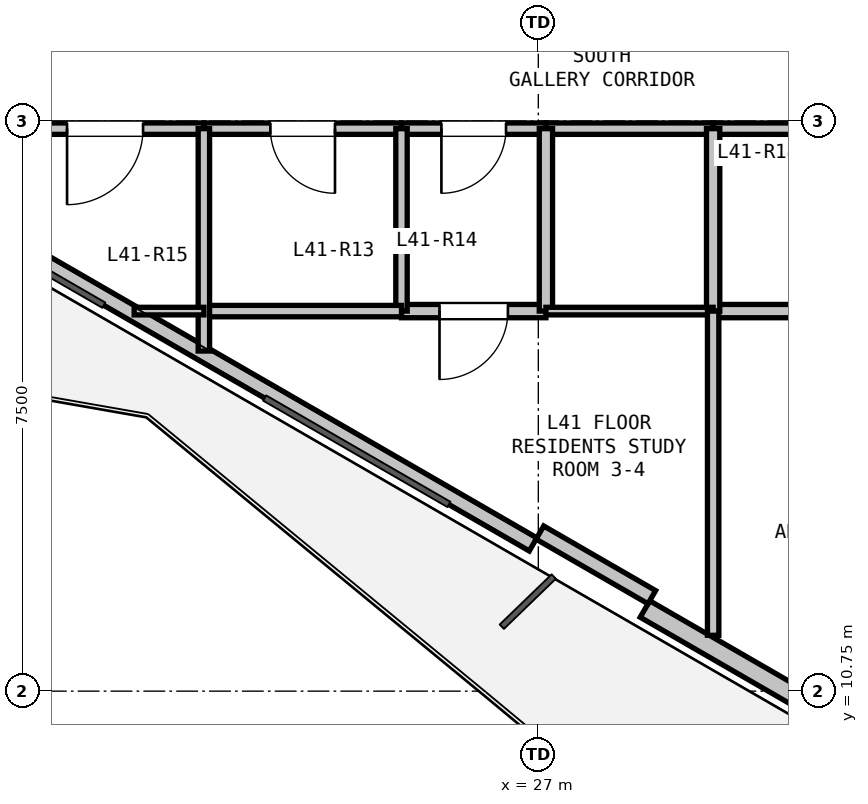
"""IFC4 building model, lengths in metres.
Left out: names, types, materials, properties, quantities, classifications, styles, units other than length and angle.
Written with IfcOpenShell. Run it as: python <this file> out.ifc"""

import sys

from ifc_helpers import new_model, si_unit, direction, frame, frame_2d, origin, place, context, subcontext, project, spatial, rectangle, extrude, element, fill, save


model = new_model("IFC4")
c1 = context("Model", 3, precision=1e-05, world=origin(), true_north=direction((0.0, 1.0)))
c2 = subcontext(c1, "Body", "Model", "MODEL_VIEW")
j1 = project(units=[si_unit("LENGTHUNIT", "METRE"), si_unit("PLANEANGLEUNIT", "RADIAN")], contexts=[c1])
p1 = place(None, origin())
s1 = spatial("IfcSite", under=j1, at=p1, CompositionType="ELEMENT")
p2 = place(p1, origin())
s2 = spatial("IfcBuilding", under=s1, at=p2, CompositionType="ELEMENT")
p3 = place(p2, frame((0.0, 0.0, 147.6)))
s3 = spatial("IfcBuildingStorey", under=s2, at=p3, CompositionType="ELEMENT", Elevation=147.6)
p4 = place(p3, frame((38.091, 6.237, 0.0), z_axis=(0.0, 0.0, 1.0), x_axis=(-0.86602239209, 0.500005216371, 0.0)))
e1 = element("IfcWall", 1, at=p4, inside=s3, PredefinedType="SOLIDWALL", context=c2, shape_type="SweptSolid", body=[
    extrude(rectangle(XDim=11.186, YDim=0.25, at=frame_2d((5.593, 0.0))), origin(), (0.0, 0.0, 1.0), 2.68),
])
p5 = place(p4, frame((7.095, 0.0, 0.0)))
e2 = element("IfcOpeningElement", 2, at=p5, cuts=e1, PredefinedType="OPENING", context=c2, shape_type="SweptSolid", body=[
    extrude(rectangle(XDim=1.1, YDim=2.1, at=frame_2d((0.55, 1.05))), frame((0.0, 0.135, 0.0), z_axis=(0.0, -1.0, 0.0), x_axis=(1.0, 0.0, 0.0)), (0.0, 0.0, 1.0), 0.27),
])
p6 = place(p4, frame((1.718, 0.0, 0.9)))
e3 = element("IfcOpeningElement", 3, at=p6, cuts=e1, PredefinedType="OPENING", context=c2, shape_type="SweptSolid", body=[
    extrude(rectangle(XDim=1.2, YDim=1.4, at=frame_2d((0.6, 0.7))), frame((0.0, 0.135, 0.0), z_axis=(0.0, -1.0, 0.0), x_axis=(1.0, 0.0, 0.0)), (0.0, 0.0, 1.0), 0.27),
])
p7 = place(p3, frame((26.931, 12.68, 0.0), z_axis=(0.0, 0.0, 1.0), x_axis=(-0.866026619769, 0.499997893847, 0.0)))
e4 = element("IfcWall", 4, at=p7, inside=s3, PredefinedType="PARAPET", context=c2, shape_type="SweptSolid", body=[
    extrude(rectangle(XDim=10.486, YDim=0.2, at=frame_2d((5.243, 0.0))), origin(), (0.0, 0.0, 1.0), 0.2),
])
p8 = place(p3, frame((28.493, 11.986, 0.0), z_axis=(0.0, 0.0, 1.0), x_axis=(-0.86605165483, 0.499954529098, 0.0)))
e5 = element("IfcWall", 5, at=p8, inside=s3, PredefinedType="PARAPET", context=c2, shape_type="SweptSolid", body=[
    extrude(rectangle(XDim=1.7, YDim=0.2, at=frame_2d((0.85, 0.0))), origin(), (0.0, 0.0, 1.0), 2.68),
])
p9 = place(p3, frame((31.3, 18.15, 0.0), z_axis=(0.0, 0.0, 1.0), x_axis=(-1.0, 0.0, 0.0)))
e6 = element("IfcWall", 6, at=p9, inside=s3, PredefinedType="PARTITIONING", context=c2, shape_type="SweptSolid", body=[
    extrude(rectangle(XDim=2.0, YDim=0.15, at=frame_2d((1.0, 0.0))), origin(), (0.0, 0.0, 1.0), 3.06),
])
p10 = place(p3, frame((29.3, 18.15, 0.0), z_axis=(0.0, 0.0, 1.0), x_axis=(-1.0, 0.0, 0.0)))
e7 = element("IfcWall", 7, at=p10, inside=s3, PredefinedType="PARTITIONING", context=c2, shape_type="SweptSolid", body=[
    extrude(rectangle(XDim=2.2, YDim=0.15, at=frame_2d((1.1, 0.0))), origin(), (0.0, 0.0, 1.0), 3.06),
])
p11 = place(p3, frame((27.1, 18.15, 0.0), z_axis=(0.0, 0.0, 1.0), x_axis=(-1.0, 0.0, 0.0)))
e8 = element("IfcWall", 8, at=p11, inside=s3, PredefinedType="PARTITIONING", context=c2, shape_type="SweptSolid", body=[
    extrude(rectangle(XDim=1.9, YDim=0.15, at=frame_2d((0.95, 0.0))), origin(), (0.0, 0.0, 1.0), 3.06),
])
p12 = place(p11, frame((0.525, 0.0, 0.0)))
e9 = element("IfcOpeningElement", 9, at=p12, cuts=e8, PredefinedType="OPENING", context=c2, shape_type="SweptSolid", body=[
    extrude(rectangle(XDim=0.85, YDim=2.1, at=frame_2d((0.425, 1.05))), frame((0.0, 0.085, 0.0), z_axis=(0.0, -1.0, 0.0), x_axis=(1.0, 0.0, 0.0)), (0.0, 0.0, 1.0), 0.17),
])
p13 = place(p3, frame((25.2, 18.15, 0.0), z_axis=(0.0, 0.0, 1.0), x_axis=(-1.0, 0.0, 0.0)))
e10 = element("IfcWall", 10, at=p13, inside=s3, PredefinedType="PARTITIONING", context=c2, shape_type="SweptSolid", body=[
    extrude(rectangle(XDim=2.6, YDim=0.15, at=frame_2d((1.3, 0.0))), origin(), (0.0, 0.0, 1.0), 2.433),
])
p14 = place(p13, frame((0.875, 0.0, 0.0)))
e11 = element("IfcOpeningElement", 11, at=p14, cuts=e10, PredefinedType="OPENING", context=c2, shape_type="SweptSolid", body=[
    extrude(rectangle(XDim=0.85, YDim=2.1, at=frame_2d((0.425, 1.05))), frame((0.0, 0.085, 0.0), z_axis=(0.0, -1.0, 0.0), x_axis=(1.0, 0.0, 0.0)), (0.0, 0.0, 1.0), 0.17),
])
p15 = place(p3, frame((22.6, 18.15, 0.0), z_axis=(0.0, 0.0, 1.0), x_axis=(-1.0, 0.0, 0.0)))
e12 = element("IfcWall", 12, at=p15, inside=s3, PredefinedType="PARTITIONING", context=c2, shape_type="SweptSolid", body=[
    extrude(rectangle(XDim=2.6, YDim=0.15, at=frame_2d((1.3, 0.0))), origin(), (0.0, 0.0, 1.0), 3.06),
])
p16 = place(p15, frame((0.8, 0.0, 0.0)))
e13 = element("IfcOpeningElement", 13, at=p16, cuts=e12, PredefinedType="OPENING", context=c2, shape_type="SweptSolid", body=[
    extrude(rectangle(XDim=1.0, YDim=2.15, at=frame_2d((0.5, 1.075))), frame((0.0, 0.085, 0.0), z_axis=(0.0, -1.0, 0.0), x_axis=(1.0, 0.0, 0.0)), (0.0, 0.0, 1.0), 0.17),
])
p17 = place(p3, frame((27.1, 15.75, 0.0), z_axis=(0.0, 0.0, 1.0), x_axis=(-1.0, 0.0, 0.0)))
e14 = element("IfcWall", 14, at=p17, inside=s3, PredefinedType="PLUMBINGWALL", context=c2, shape_type="SweptSolid", body=[
    extrude(rectangle(XDim=1.9, YDim=0.175, at=frame_2d((0.95, 0.0))), origin(), (0.0, 0.0, 1.0), 2.433),
])
p18 = place(p17, frame((0.5, 0.0, 0.0)))
e15 = element("IfcOpeningElement", 15, at=p18, cuts=e14, PredefinedType="OPENING", context=c2, shape_type="SweptSolid", body=[
    extrude(rectangle(XDim=0.9, YDim=2.1, at=frame_2d((0.45, 1.05))), frame((0.0, 0.097, 0.0), z_axis=(0.0, -1.0, 0.0), x_axis=(1.0, 0.0, 0.0)), (0.0, 0.0, 1.0), 0.195),
])
p19 = place(p3, frame((25.2, 15.75, 0.0), z_axis=(0.0, 0.0, 1.0), x_axis=(0.0, 1.0, 0.0)))
e16 = element("IfcWall", 16, at=p19, inside=s3, PredefinedType="PARTITIONING", context=c2, shape_type="SweptSolid", body=[
    extrude(rectangle(XDim=2.4, YDim=0.15, at=frame_2d((1.2, 0.0))), origin(), (0.0, 0.0, 1.0), 2.433),
])
p20 = place(p3, frame((27.1, 18.15, 0.0), z_axis=(0.0, 0.0, 1.0), x_axis=(0.0, -1.0, 0.0)))
e17 = element("IfcWall", 17, at=p20, inside=s3, PredefinedType="PLUMBINGWALL", context=c2, shape_type="SweptSolid", body=[
    extrude(rectangle(XDim=2.4, YDim=0.175, at=frame_2d((1.2, 0.0))), origin(), (0.0, 0.0, 1.0), 2.433),
])
p21 = place(p3, frame((31.3, 15.75, 0.0), z_axis=(0.0, 0.0, 1.0), x_axis=(-1.0, 0.0, 0.0)))
e18 = element("IfcWall", 18, at=p21, inside=s3, PredefinedType="PLUMBINGWALL", context=c2, shape_type="SweptSolid", body=[
    extrude(rectangle(XDim=2.0, YDim=0.175, at=frame_2d((1.0, 0.0))), origin(), (0.0, 0.0, 1.0), 3.06),
])
p22 = place(p3, frame((29.3, 15.75, 0.0), z_axis=(0.0, 0.0, 1.0), x_axis=(0.0, 1.0, 0.0)))
e19 = element("IfcWall", 19, at=p22, inside=s3, PredefinedType="PLUMBINGWALL", context=c2, shape_type="SweptSolid", body=[
    extrude(rectangle(XDim=2.4, YDim=0.175, at=frame_2d((1.2, 0.0))), origin(), (0.0, 0.0, 1.0), 3.06),
])
p23 = place(p3, frame((25.2, 15.75, 0.0), z_axis=(0.0, 0.0, 1.0), x_axis=(-1.0, 0.0, 0.0)))
e20 = element("IfcWall", 20, at=p23, inside=s3, PredefinedType="PARTITIONING", context=c2, shape_type="SweptSolid", body=[
    extrude(rectangle(XDim=2.6, YDim=0.15, at=frame_2d((1.3, 0.0))), origin(), (0.0, 0.0, 1.0), 2.365),
])
p24 = place(p3, frame((22.6, 15.225, 0.0), z_axis=(0.0, 0.0, 1.0), x_axis=(0.0, 1.0, 0.0)))
e21 = element("IfcWall", 21, at=p24, inside=s3, PredefinedType="PARTITIONING", context=c2, shape_type="SweptSolid", body=[
    extrude(rectangle(XDim=2.925, YDim=0.15, at=frame_2d((1.463, 0.0))), origin(), (0.0, 0.0, 1.0), 2.365),
])
p25 = place(p3, frame((22.6, 15.75, 0.0), z_axis=(0.0, 0.0, 1.0), x_axis=(-1.0, 0.0, 0.0)))
e22 = element("IfcWall", 22, at=p25, inside=s3, PredefinedType="PARTITIONING", context=c2, shape_type="SweptSolid", body=[
    extrude(rectangle(XDim=0.917, YDim=0.1, at=frame_2d((0.458, 0.0))), origin(), (0.0, 0.0, 1.0), 2.365),
])
p26 = place(p3, frame((27.1, 15.75, 0.0), z_axis=(0.0, 0.0, 1.0), x_axis=(1.0, 0.0, 0.0)))
e23 = element("IfcWall", 23, at=p26, inside=s3, PredefinedType="PARTITIONING", context=c2, shape_type="SweptSolid", body=[
    extrude(rectangle(XDim=2.2, YDim=0.1, at=frame_2d((1.1, 0.0))), origin(), (0.0, 0.0, 1.0), 2.433),
])
p27 = place(p3, frame((29.3, 15.75, 0.0), z_axis=(0.0, 0.0, 1.0), x_axis=(0.0, -1.0, 0.0)))
e24 = element("IfcWall", 24, at=p27, inside=s3, PredefinedType="PARTITIONING", context=c2, shape_type="SweptSolid", body=[
    extrude(rectangle(XDim=4.265, YDim=0.15, at=frame_2d((2.133, 0.0))), origin(), (0.0, 0.0, 1.0), 2.365),
])
p28 = place(p12, origin())
e25 = element("IfcDoor", 25, at=p28, inside=s3, OperationType="SINGLE_SWING_RIGHT", PredefinedType="DOOR", context=c2, shape_type="SweptSolid", body=[
    extrude(rectangle(XDim=0.85, YDim=2.1, at=frame_2d((0.425, 1.05))), frame((0.0, 0.025, 0.0), z_axis=(0.0, -1.0, 0.0), x_axis=(1.0, 0.0, 0.0)), (0.0, 0.0, 1.0), 0.05),
])
fill(e9, e25)
p29 = place(p14, origin())
e26 = element("IfcDoor", 26, at=p29, inside=s3, OperationType="SINGLE_SWING_LEFT", PredefinedType="DOOR", context=c2, shape_type="SweptSolid", body=[
    extrude(rectangle(XDim=0.85, YDim=2.1, at=frame_2d((0.425, 1.05))), frame((0.0, 0.025, 0.0), z_axis=(0.0, -1.0, 0.0), x_axis=(1.0, 0.0, 0.0)), (0.0, 0.0, 1.0), 0.05),
])
fill(e11, e26)
p30 = place(p16, origin())
e27 = element("IfcDoor", 27, at=p30, inside=s3, OperationType="SINGLE_SWING_RIGHT", PredefinedType="DOOR", context=c2, shape_type="SweptSolid", body=[
    extrude(rectangle(XDim=1.0, YDim=2.15, at=frame_2d((0.5, 1.075))), frame((0.0, 0.025, 0.0), z_axis=(0.0, -1.0, 0.0), x_axis=(1.0, 0.0, 0.0)), (0.0, 0.0, 1.0), 0.05),
])
fill(e13, e27)
p31 = place(p18, origin())
e28 = element("IfcDoor", 28, at=p31, inside=s3, OperationType="SINGLE_SWING_RIGHT", PredefinedType="DOOR", context=c2, shape_type="SweptSolid", body=[
    extrude(rectangle(XDim=0.9, YDim=2.1, at=frame_2d((0.45, 1.05))), frame((0.0, 0.025, 0.0), z_axis=(0.0, -1.0, 0.0), x_axis=(1.0, 0.0, 0.0)), (0.0, 0.0, 1.0), 0.05),
])
fill(e15, e28)
save(model, sys.argv[1])
